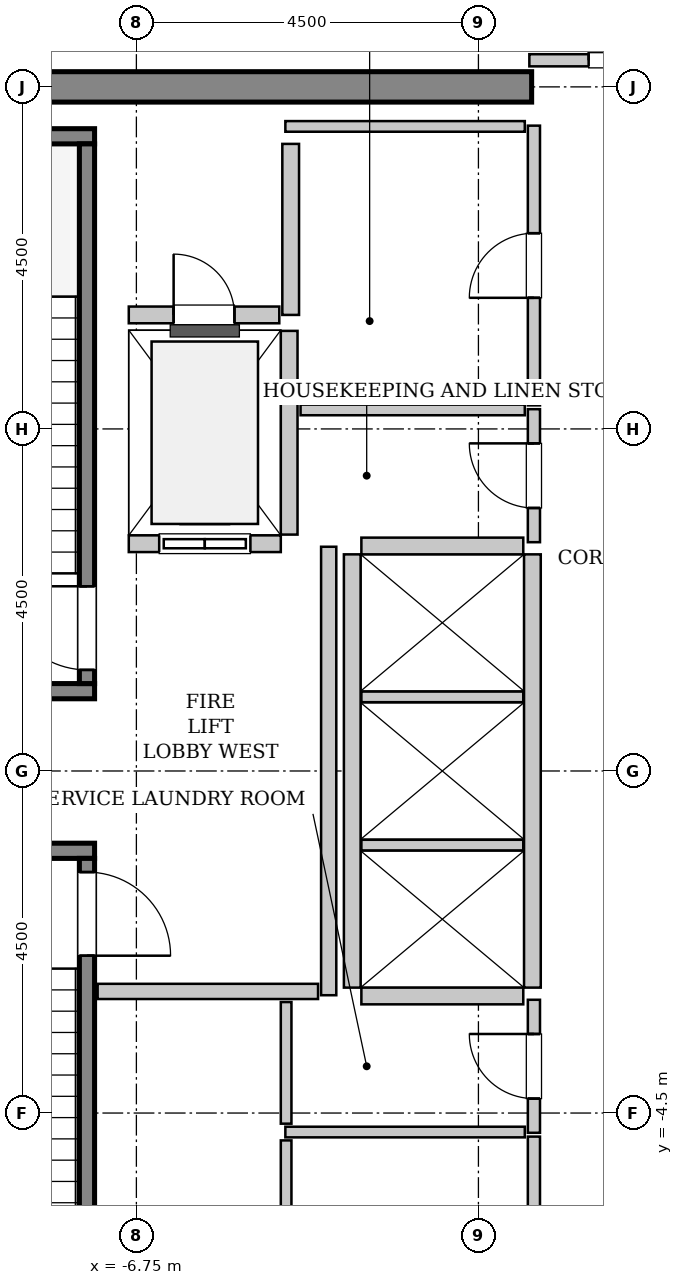
"""IFC4 building model, lengths in metres.
Left out: names, types, materials, properties, quantities, classifications, styles, units other than length and angle.
Written with IfcOpenShell. Run it as: python <this file> out.ifc"""

import sys

from ifc_helpers import new_model, si_unit, direction, frame, frame_2d, origin, place, context, subcontext, project, spatial, rectangle, extrude, source, transform, mapped, element, fill, save


model = new_model("IFC4")
c1 = context("Model", 3, precision=1e-05, world=origin(), true_north=direction((0.0, 1.0)))
c2 = subcontext(c1, "Body", "Model", "MODEL_VIEW")
j1 = project(units=[si_unit("LENGTHUNIT", "METRE"), si_unit("PLANEANGLEUNIT", "RADIAN")], contexts=[c1])
p1 = place(None, origin())
s1 = spatial("IfcSite", under=j1, at=p1, CompositionType="ELEMENT")
p2 = place(p1, origin())
s2 = spatial("IfcBuilding", under=s1, at=p2, CompositionType="ELEMENT")
p3 = place(p2, frame((0.0, 0.0, 349.0)))
s3 = spatial("IfcBuildingStorey", under=s2, at=p3, CompositionType="ELEMENT", Elevation=349.0)
m1 = source(origin(), c2, "Body", "SweptSolid", [
    extrude(rectangle(XDim=9.9, YDim=0.4, at=frame_2d((4.95, 0.0))), origin(), (0.0, 0.0, 1.0), 4.8),
])
p4 = place(p3, frame((-11.45, 9.0, 0.0), z_axis=(0.0, 0.0, 1.0), x_axis=(1.0, 0.0, 0.0)))
e1 = element("IfcWall", 1, at=p4, inside=s3, PredefinedType="SHEAR", context=c2, shape_type="MappedRepresentation", body=[
    mapped(m1, transform((0.0, 0.0, 0.0), x_axis=(1.0, 0.0, 0.0), y_axis=(0.0, 1.0, 0.0), z_axis=(0.0, 0.0, 1.0), scale=1.0)),
])
m2 = source(origin(), c2, "Body", "SweptSolid", [
    extrude(rectangle(XDim=3.4, YDim=0.2, at=frame_2d((1.7, 0.0))), origin(), (0.0, 0.0, 1.0), 4.8),
])
p5 = place(p3, frame((-7.3, 1.05, 0.0), z_axis=(0.0, 0.0, 1.0), x_axis=(-1.0, 0.0, 0.0)))
e2 = element("IfcWall", 2, at=p5, inside=s3, PredefinedType="SOLIDWALL", context=c2, shape_type="MappedRepresentation", body=[
    mapped(m2, transform((0.0, 0.0, 0.0), x_axis=(1.0, 0.0, 0.0), y_axis=(0.0, 1.0, 0.0), z_axis=(0.0, 0.0, 1.0), scale=1.0)),
])
m3 = source(origin(), c2, "Body", "SweptSolid", [
    extrude(rectangle(XDim=3.755, YDim=0.2, at=frame_2d((1.877, 0.0))), origin(), (0.0, 0.0, 1.0), 4.8),
])
p6 = place(p3, frame((-7.3, 8.35, 0.0), z_axis=(0.0, 0.0, 1.0), x_axis=(-1.0, 0.0, 0.0)))
e3 = element("IfcWall", 3, at=p6, inside=s3, PredefinedType="SOLIDWALL", context=c2, shape_type="MappedRepresentation", body=[
    mapped(m3, transform((0.0, 0.0, 0.0), x_axis=(1.0, 0.0, 0.0), y_axis=(0.0, 1.0, 0.0), z_axis=(0.0, 0.0, 1.0), scale=1.0)),
])
m4 = source(origin(), c2, "Body", "SweptSolid", [
    extrude(rectangle(XDim=7.1, YDim=0.2, at=frame_2d((3.55, 0.0))), origin(), (0.0, 0.0, 1.0), 4.8),
])
p7 = place(p3, frame((-7.4, 1.15, 0.0), z_axis=(0.0, 0.0, 1.0), x_axis=(0.0, 1.0, 0.0)))
e4 = element("IfcWall", 4, at=p7, inside=s3, PredefinedType="SOLIDWALL", context=c2, shape_type="MappedRepresentation", body=[
    mapped(m4, transform((0.0, 0.0, 0.0), x_axis=(1.0, 0.0, 0.0), y_axis=(0.0, 1.0, 0.0), z_axis=(0.0, 0.0, 1.0), scale=1.0)),
])
p8 = place(p7, frame((0.18, 0.0, 0.0)))
e5 = element("IfcOpeningElement", 5, at=p8, cuts=e4, PredefinedType="OPENING", context=c2, shape_type="SweptSolid", body=[
    extrude(rectangle(XDim=1.1, YDim=2.15, at=frame_2d((0.55, 1.075))), frame((0.0, 0.11, 0.0), z_axis=(0.0, -1.0, 0.0), x_axis=(1.0, 0.0, 0.0)), (0.0, 0.0, 1.0), 0.22),
])
p9 = place(p3, frame((-10.7, -1.05, 0.0), z_axis=(0.0, 0.0, 1.0), x_axis=(1.0, 0.0, 0.0)))
e6 = element("IfcWall", 6, at=p9, inside=s3, PredefinedType="SOLIDWALL", context=c2, shape_type="MappedRepresentation", body=[
    mapped(m2, transform((0.0, 0.0, 0.0), x_axis=(1.0, 0.0, 0.0), y_axis=(0.0, 1.0, 0.0), z_axis=(0.0, 0.0, 1.0), scale=1.0)),
])
p10 = place(p3, frame((-7.4, -1.15, 0.0), z_axis=(0.0, 0.0, 1.0), x_axis=(0.0, -1.0, 0.0)))
e7 = element("IfcWall", 7, at=p10, inside=s3, PredefinedType="SOLIDWALL", context=c2, shape_type="MappedRepresentation", body=[
    mapped(m4, transform((0.0, 0.0, 0.0), x_axis=(1.0, 0.0, 0.0), y_axis=(0.0, 1.0, 0.0), z_axis=(0.0, 0.0, 1.0), scale=1.0)),
])
p11 = place(p10, frame((0.18, 0.0, 0.0)))
e8 = element("IfcOpeningElement", 8, at=p11, cuts=e7, PredefinedType="OPENING", context=c2, shape_type="SweptSolid", body=[
    extrude(rectangle(XDim=1.1, YDim=2.15, at=frame_2d((0.55, 1.075))), frame((0.0, 0.11, 0.0), z_axis=(0.0, -1.0, 0.0), x_axis=(1.0, 0.0, 0.0)), (0.0, 0.0, 1.0), 0.22),
])
m5 = source(origin(), c2, "Body", "SweptSolid", [
    extrude(rectangle(XDim=2.0, YDim=0.22, at=frame_2d((1.0, 0.0))), origin(), (0.0, 0.0, 1.0), 4.485),
])
p12 = place(p3, frame((-6.85, 2.99, 0.0), z_axis=(0.0, 0.0, 1.0), x_axis=(1.0, 0.0, 0.0)))
e9 = element("IfcWall", 9, at=p12, inside=s3, PredefinedType="SOLIDWALL", context=c2, shape_type="MappedRepresentation", body=[
    mapped(m5, transform((0.0, 0.0, 0.0), x_axis=(1.0, 0.0, 0.0), y_axis=(0.0, 1.0, 0.0), z_axis=(0.0, 0.0, 1.0), scale=1.0)),
])
p13 = place(p12, frame((0.4, 0.0, 0.0)))
e10 = element("IfcOpeningElement", 10, at=p13, cuts=e9, PredefinedType="OPENING", context=c2, shape_type="SweptSolid", body=[
    extrude(rectangle(XDim=1.2, YDim=2.2, at=frame_2d((0.6, 1.1))), frame((0.0, 0.12, 0.0), z_axis=(0.0, -1.0, 0.0), x_axis=(1.0, 0.0, 0.0)), (0.0, 0.0, 1.0), 0.24),
])
m6 = source(origin(), c2, "Body", "SweptSolid", [
    extrude(rectangle(XDim=2.68, YDim=0.22, at=frame_2d((1.34, 0.0))), origin(), (0.0, 0.0, 1.0), 4.485),
])
p14 = place(p3, frame((-4.74, 3.11, 0.0), z_axis=(0.0, 0.0, 1.0), x_axis=(0.0, 1.0, 0.0)))
e11 = element("IfcWall", 11, at=p14, inside=s3, PredefinedType="SOLIDWALL", context=c2, shape_type="MappedRepresentation", body=[
    mapped(m6, transform((0.0, 0.0, 0.0), x_axis=(1.0, 0.0, 0.0), y_axis=(0.0, 1.0, 0.0), z_axis=(0.0, 0.0, 1.0), scale=1.0)),
])
m7 = source(origin(), c2, "Body", "SweptSolid", [
    extrude(rectangle(XDim=5.7, YDim=0.22, at=frame_2d((2.85, 0.0))), origin(), (0.0, 0.0, 1.0), 4.485),
])
for number, where, z_axis, x_axis in (
    (12, (-1.54, -2.85, 0.0), (0.0, 0.0, 1.0), (0.0, 1.0, 0.0)),
    (13, (-3.91, 2.85, 0.0), (0.0, 0.0, 1.0), (0.0, -1.0, 0.0)),
):
    element("IfcWall", number, at=place(p3, frame(where, z_axis=z_axis, x_axis=x_axis)), inside=s3, PredefinedType="SOLIDWALL", context=c2, shape_type="MappedRepresentation", body=[
        mapped(m7, transform((0.0, 0.0, 0.0), x_axis=(1.0, 0.0, 0.0), y_axis=(0.0, 1.0, 0.0), z_axis=(0.0, 0.0, 1.0), scale=1.0)),
    ])
m8 = source(origin(), c2, "Body", "SweptSolid", [
    extrude(rectangle(XDim=2.13, YDim=0.22, at=frame_2d((1.065, 0.0))), origin(), (0.0, 0.0, 1.0), 4.485),
])
p15 = place(p3, frame((-3.79, -2.96, 0.0), z_axis=(0.0, 0.0, 1.0), x_axis=(1.0, 0.0, 0.0)))
e14 = element("IfcWall", 14, at=p15, inside=s3, PredefinedType="SOLIDWALL", context=c2, shape_type="MappedRepresentation", body=[
    mapped(m8, transform((0.0, 0.0, 0.0), x_axis=(1.0, 0.0, 0.0), y_axis=(0.0, 1.0, 0.0), z_axis=(0.0, 0.0, 1.0), scale=1.0)),
])
m9 = source(origin(), c2, "Body", "SweptSolid", [
    extrude(rectangle(XDim=2.13, YDim=0.14, at=frame_2d((1.065, 0.0))), origin(), (0.0, 0.0, 1.0), 4.485),
])
for number, where, z_axis, x_axis in (
    (15, (-3.79, -0.975, 0.0), (0.0, 0.0, 1.0), (1.0, 0.0, 0.0)),
    (16, (-3.79, 0.975, 0.0), (0.0, 0.0, 1.0), (1.0, 0.0, 0.0)),
):
    element("IfcWall", number, at=place(p3, frame(where, z_axis=z_axis, x_axis=x_axis)), inside=s3, PredefinedType="PARTITIONING", context=c2, shape_type="MappedRepresentation", body=[
        mapped(m9, transform((0.0, 0.0, 0.0), x_axis=(1.0, 0.0, 0.0), y_axis=(0.0, 1.0, 0.0), z_axis=(0.0, 0.0, 1.0), scale=1.0)),
    ])
p16 = place(p3, frame((-1.66, 2.96, 0.0), z_axis=(0.0, 0.0, 1.0), x_axis=(-1.0, 0.0, 0.0)))
e17 = element("IfcWall", 17, at=p16, inside=s3, PredefinedType="SOLIDWALL", context=c2, shape_type="MappedRepresentation", body=[
    mapped(m8, transform((0.0, 0.0, 0.0), x_axis=(1.0, 0.0, 0.0), y_axis=(0.0, 1.0, 0.0), z_axis=(0.0, 0.0, 1.0), scale=1.0)),
])
m10 = source(origin(), c2, "Body", "SweptSolid", [
    extrude(rectangle(XDim=2.25, YDim=0.22, at=frame_2d((1.125, 0.0))), origin(), (0.0, 0.0, 1.0), 4.485),
])
p17 = place(p3, frame((-4.72, 6.0, 0.0), z_axis=(0.0, 0.0, 1.0), x_axis=(0.0, 1.0, 0.0)))
e18 = element("IfcWall", 18, at=p17, inside=s3, PredefinedType="SOLIDWALL", context=c2, shape_type="MappedRepresentation", body=[
    mapped(m10, transform((0.0, 0.0, 0.0), x_axis=(1.0, 0.0, 0.0), y_axis=(0.0, 1.0, 0.0), z_axis=(0.0, 0.0, 1.0), scale=1.0)),
])
m11 = source(origin(), c2, "Body", "SweptSolid", [
    extrude(rectangle(XDim=1.98, YDim=0.22, at=frame_2d((0.99, 0.0))), origin(), (0.0, 0.0, 1.0), 4.485),
])
p18 = place(p3, frame((-6.85, 6.0, 0.0), z_axis=(0.0, 0.0, 1.0), x_axis=(1.0, 0.0, 0.0)))
e19 = element("IfcWall", 19, at=p18, inside=s3, PredefinedType="SOLIDWALL", context=c2, shape_type="MappedRepresentation", body=[
    mapped(m11, transform((0.0, 0.0, 0.0), x_axis=(1.0, 0.0, 0.0), y_axis=(0.0, 1.0, 0.0), z_axis=(0.0, 0.0, 1.0), scale=1.0)),
])
p19 = place(p18, frame((0.59, 0.0, 0.0)))
e20 = element("IfcOpeningElement", 20, at=p19, cuts=e19, PredefinedType="OPENING", context=c2, shape_type="SweptSolid", body=[
    extrude(rectangle(XDim=0.8, YDim=2.0, at=frame_2d((0.4, 1.0))), frame((0.0, 0.12, 0.0), z_axis=(0.0, -1.0, 0.0), x_axis=(1.0, 0.0, 0.0)), (0.0, 0.0, 1.0), 0.24),
])
m12 = source(origin(), c2, "Body", "SweptSolid", [
    extrude(rectangle(XDim=5.9, YDim=0.2, at=frame_2d((2.95, 0.0))), origin(), (0.0, 0.0, 1.0), 4.485),
])
p20 = place(p3, frame((-4.22, -2.95, 0.0), z_axis=(0.0, 0.0, 1.0), x_axis=(0.0, 1.0, 0.0)))
e21 = element("IfcWall", 21, at=p20, inside=s3, PredefinedType="PARTITIONING", context=c2, shape_type="MappedRepresentation", body=[
    mapped(m12, transform((0.0, 0.0, 0.0), x_axis=(1.0, 0.0, 0.0), y_axis=(0.0, 1.0, 0.0), z_axis=(0.0, 0.0, 1.0), scale=1.0)),
])
m13 = source(origin(), c2, "Body", "SweptSolid", [
    extrude(rectangle(XDim=2.9, YDim=0.2, at=frame_2d((1.45, 0.0))), origin(), (0.0, 0.0, 1.0), 4.485),
])
p21 = place(p3, frame((-7.26, -2.9, 0.0), z_axis=(0.0, 0.0, 1.0), x_axis=(1.0, 0.0, 0.0)))
e22 = element("IfcWall", 22, at=p21, inside=s3, PredefinedType="PARTITIONING", context=c2, shape_type="MappedRepresentation", body=[
    mapped(m13, transform((0.0, 0.0, 0.0), x_axis=(1.0, 0.0, 0.0), y_axis=(0.0, 1.0, 0.0), z_axis=(0.0, 0.0, 1.0), scale=1.0)),
])
m14 = source(origin(), c2, "Body", "SweptSolid", [
    extrude(rectangle(XDim=3.16, YDim=0.16, at=frame_2d((1.58, 0.0))), origin(), (0.0, 0.0, 1.0), 3.575),
])
p22 = place(p3, frame((-1.58, 9.35, 0.0), z_axis=(0.0, 0.0, 1.0), x_axis=(1.0, 0.0, 0.0)))
e23 = element("IfcWall", 23, at=p22, inside=s3, PredefinedType="PARTITIONING", context=c2, shape_type="MappedRepresentation", body=[
    mapped(m14, transform((0.0, 0.0, 0.0), x_axis=(1.0, 0.0, 0.0), y_axis=(0.0, 1.0, 0.0), z_axis=(0.0, 0.0, 1.0), scale=1.0)),
])
p23 = place(p22, frame((0.78, 0.0, 0.0)))
e24 = element("IfcOpeningElement", 24, at=p23, cuts=e23, PredefinedType="OPENING", context=c2, shape_type="SweptSolid", body=[
    extrude(rectangle(XDim=1.6, YDim=2.3, at=frame_2d((0.8, 1.15))), frame((0.0, 0.09, 0.0), z_axis=(0.0, -1.0, 0.0), x_axis=(1.0, 0.0, 0.0)), (0.0, 0.0, 1.0), 0.18),
])
m15 = source(origin(), c2, "Body", "SweptSolid", [
    extrude(rectangle(XDim=1.75, YDim=0.16, at=frame_2d((0.875, 0.0))), origin(), (0.0, 0.0, 1.0), 4.485),
])
p24 = place(p3, frame((-1.52, 3.01, 0.0), z_axis=(0.0, 0.0, 1.0), x_axis=(0.0, 1.0, 0.0)))
e25 = element("IfcWall", 25, at=p24, inside=s3, PredefinedType="PARTITIONING", context=c2, shape_type="MappedRepresentation", body=[
    mapped(m15, transform((0.0, 0.0, 0.0), x_axis=(1.0, 0.0, 0.0), y_axis=(0.0, 1.0, 0.0), z_axis=(0.0, 0.0, 1.0), scale=1.0)),
])
p25 = place(p24, frame((0.45, 0.0, 0.0)))
e26 = element("IfcOpeningElement", 26, at=p25, cuts=e25, PredefinedType="OPENING", context=c2, shape_type="SweptSolid", body=[
    extrude(rectangle(XDim=0.85, YDim=2.1, at=frame_2d((0.425, 1.05))), frame((0.0, 0.09, 0.0), z_axis=(0.0, -1.0, 0.0), x_axis=(1.0, 0.0, 0.0)), (0.0, 0.0, 1.0), 0.18),
])
m16 = source(origin(), c2, "Body", "SweptSolid", [
    extrude(rectangle(XDim=2.95, YDim=0.14, at=frame_2d((1.475, 0.0))), origin(), (0.0, 0.0, 1.0), 4.485),
])
p26 = place(p3, frame((-4.59, 4.75, 0.0), z_axis=(0.0, 0.0, 1.0), x_axis=(1.0, 0.0, 0.0)))
e27 = element("IfcWall", 27, at=p26, inside=s3, PredefinedType="PARTITIONING", context=c2, shape_type="MappedRepresentation", body=[
    mapped(m16, transform((0.0, 0.0, 0.0), x_axis=(1.0, 0.0, 0.0), y_axis=(0.0, 1.0, 0.0), z_axis=(0.0, 0.0, 1.0), scale=1.0)),
])
m17 = source(origin(), c2, "Body", "SweptSolid", [
    extrude(rectangle(XDim=3.68, YDim=0.16, at=frame_2d((1.84, 0.0))), origin(), (0.0, 0.0, 1.0), 4.485),
])
p27 = place(p3, frame((-1.52, 4.81, 0.0), z_axis=(0.0, 0.0, 1.0), x_axis=(0.0, 1.0, 0.0)))
e28 = element("IfcWall", 28, at=p27, inside=s3, PredefinedType="PARTITIONING", context=c2, shape_type="MappedRepresentation", body=[
    mapped(m17, transform((0.0, 0.0, 0.0), x_axis=(1.0, 0.0, 0.0), y_axis=(0.0, 1.0, 0.0), z_axis=(0.0, 0.0, 1.0), scale=1.0)),
])
p28 = place(p27, frame((1.415, 0.0, 0.0)))
e29 = element("IfcOpeningElement", 29, at=p28, cuts=e28, PredefinedType="OPENING", context=c2, shape_type="SweptSolid", body=[
    extrude(rectangle(XDim=0.85, YDim=2.1, at=frame_2d((0.425, 1.05))), frame((0.0, 0.09, 0.0), z_axis=(0.0, -1.0, 0.0), x_axis=(1.0, 0.0, 0.0)), (0.0, 0.0, 1.0), 0.18),
])
m18 = source(origin(), c2, "Body", "SweptSolid", [
    extrude(rectangle(XDim=3.15, YDim=0.14, at=frame_2d((1.575, 0.0))), origin(), (0.0, 0.0, 1.0), 4.485),
])
p29 = place(p3, frame((-4.79, 8.48, 0.0), z_axis=(0.0, 0.0, 1.0), x_axis=(1.0, 0.0, 0.0)))
e30 = element("IfcWall", 30, at=p29, inside=s3, PredefinedType="PARTITIONING", context=c2, shape_type="MappedRepresentation", body=[
    mapped(m18, transform((0.0, 0.0, 0.0), x_axis=(1.0, 0.0, 0.0), y_axis=(0.0, 1.0, 0.0), z_axis=(0.0, 0.0, 1.0), scale=1.0)),
])
p30 = place(p3, frame((-1.52, -4.76, 0.0), z_axis=(0.0, 0.0, 1.0), x_axis=(0.0, 1.0, 0.0)))
e31 = element("IfcWall", 31, at=p30, inside=s3, PredefinedType="PARTITIONING", context=c2, shape_type="MappedRepresentation", body=[
    mapped(m15, transform((0.0, 0.0, 0.0), x_axis=(1.0, 0.0, 0.0), y_axis=(0.0, 1.0, 0.0), z_axis=(0.0, 0.0, 1.0), scale=1.0)),
])
p31 = place(p30, frame((0.45, 0.0, 0.0)))
e32 = element("IfcOpeningElement", 32, at=p31, cuts=e31, PredefinedType="OPENING", context=c2, shape_type="SweptSolid", body=[
    extrude(rectangle(XDim=0.85, YDim=2.1, at=frame_2d((0.425, 1.05))), frame((0.0, 0.09, 0.0), z_axis=(0.0, -1.0, 0.0), x_axis=(1.0, 0.0, 0.0)), (0.0, 0.0, 1.0), 0.18),
])
p32 = place(p3, frame((-4.79, -4.75, 0.0), z_axis=(0.0, 0.0, 1.0), x_axis=(1.0, 0.0, 0.0)))
e33 = element("IfcWall", 33, at=p32, inside=s3, PredefinedType="PARTITIONING", context=c2, shape_type="MappedRepresentation", body=[
    mapped(m18, transform((0.0, 0.0, 0.0), x_axis=(1.0, 0.0, 0.0), y_axis=(0.0, 1.0, 0.0), z_axis=(0.0, 0.0, 1.0), scale=1.0)),
])
m19 = source(origin(), c2, "Body", "SweptSolid", [
    extrude(rectangle(XDim=1.6, YDim=0.14, at=frame_2d((0.8, 0.0))), origin(), (0.0, 0.0, 1.0), 4.485),
])
p33 = place(p3, frame((-4.78, -4.64, 0.0), z_axis=(0.0, 0.0, 1.0), x_axis=(0.0, 1.0, 0.0)))
e34 = element("IfcWall", 34, at=p33, inside=s3, PredefinedType="PARTITIONING", context=c2, shape_type="MappedRepresentation", body=[
    mapped(m19, transform((0.0, 0.0, 0.0), x_axis=(1.0, 0.0, 0.0), y_axis=(0.0, 1.0, 0.0), z_axis=(0.0, 0.0, 1.0), scale=1.0)),
])
p34 = place(p3, frame((-1.52, -8.49, 0.0), z_axis=(0.0, 0.0, 1.0), x_axis=(0.0, 1.0, 0.0)))
e35 = element("IfcWall", 35, at=p34, inside=s3, PredefinedType="PARTITIONING", context=c2, shape_type="MappedRepresentation", body=[
    mapped(m17, transform((0.0, 0.0, 0.0), x_axis=(1.0, 0.0, 0.0), y_axis=(0.0, 1.0, 0.0), z_axis=(0.0, 0.0, 1.0), scale=1.0)),
])
p35 = place(p34, frame((1.415, 0.0, 0.0)))
e36 = element("IfcOpeningElement", 36, at=p35, cuts=e35, PredefinedType="OPENING", context=c2, shape_type="SweptSolid", body=[
    extrude(rectangle(XDim=0.85, YDim=2.1, at=frame_2d((0.425, 1.05))), frame((0.0, 0.09, 0.0), z_axis=(0.0, -1.0, 0.0), x_axis=(1.0, 0.0, 0.0)), (0.0, 0.0, 1.0), 0.18),
])
m20 = source(origin(), c2, "Body", "SweptSolid", [
    extrude(rectangle(XDim=3.63, YDim=0.14, at=frame_2d((1.815, 0.0))), origin(), (0.0, 0.0, 1.0), 4.485),
])
p36 = place(p3, frame((-4.78, -8.49, 0.0), z_axis=(0.0, 0.0, 1.0), x_axis=(0.0, 1.0, 0.0)))
e37 = element("IfcWall", 37, at=p36, inside=s3, PredefinedType="PARTITIONING", context=c2, shape_type="MappedRepresentation", body=[
    mapped(m20, transform((0.0, 0.0, 0.0), x_axis=(1.0, 0.0, 0.0), y_axis=(0.0, 1.0, 0.0), z_axis=(0.0, 0.0, 1.0), scale=1.0)),
])
m21 = source(origin(), c2, "Body", "SweptSolid", [
    extrude(rectangle(XDim=1.1, YDim=2.15, at=frame_2d((0.55, 1.075))), frame((0.0, 0.025, 0.0), z_axis=(0.0, -1.0, 0.0), x_axis=(1.0, 0.0, 0.0)), (0.0, 0.0, 1.0), 0.05),
])
p37 = place(p8, origin())
e38 = element("IfcDoor", 38, at=p37, inside=s3, OperationType="SINGLE_SWING_RIGHT", PredefinedType="DOOR", context=c2, shape_type="MappedRepresentation", body=[
    mapped(m21, transform((0.0, 0.0, 0.0), x_axis=(1.0, 0.0, 0.0), y_axis=(0.0, 1.0, 0.0), z_axis=(0.0, 0.0, 1.0), scale=1.0)),
])
fill(e5, e38)
p38 = place(p11, origin())
e39 = element("IfcDoor", 39, at=p38, inside=s3, OperationType="SINGLE_SWING_RIGHT", PredefinedType="DOOR", context=c2, shape_type="MappedRepresentation", body=[
    mapped(m21, transform((0.0, 0.0, 0.0), x_axis=(1.0, 0.0, 0.0), y_axis=(0.0, 1.0, 0.0), z_axis=(0.0, 0.0, 1.0), scale=1.0)),
])
fill(e8, e39)
m22 = source(origin(), c2, "Body", "SweptSolid", [
    extrude(rectangle(XDim=1.2, YDim=2.2, at=frame_2d((0.6, 1.1))), frame((0.0, 0.025, 0.0), z_axis=(0.0, -1.0, 0.0), x_axis=(1.0, 0.0, 0.0)), (0.0, 0.0, 1.0), 0.05),
])
p39 = place(p13, origin())
e40 = element("IfcDoor", 40, at=p39, inside=s3, OperationType="SLIDING_TO_LEFT", PredefinedType="DOOR", context=c2, shape_type="MappedRepresentation", body=[
    mapped(m22, transform((0.0, 0.0, 0.0), x_axis=(1.0, 0.0, 0.0), y_axis=(0.0, 1.0, 0.0), z_axis=(0.0, 0.0, 1.0), scale=1.0)),
])
fill(e10, e40)
m23 = source(origin(), c2, "Body", "SweptSolid", [
    extrude(rectangle(XDim=0.8, YDim=2.0, at=frame_2d((0.4, 1.0))), frame((0.0, 0.025, 0.0), z_axis=(0.0, -1.0, 0.0), x_axis=(1.0, 0.0, 0.0)), (0.0, 0.0, 1.0), 0.05),
])
p40 = place(p19, origin())
e41 = element("IfcDoor", 41, at=p40, inside=s3, OperationType="SINGLE_SWING_LEFT", PredefinedType="TRAPDOOR", context=c2, shape_type="MappedRepresentation", body=[
    mapped(m23, transform((0.0, 0.0, 0.0), x_axis=(1.0, 0.0, 0.0), y_axis=(0.0, 1.0, 0.0), z_axis=(0.0, 0.0, 1.0), scale=1.0)),
])
fill(e20, e41)
m24 = source(origin(), c2, "Body", "SweptSolid", [
    extrude(rectangle(XDim=1.6, YDim=2.3, at=frame_2d((0.8, 1.15))), frame((0.0, 0.025, 0.0), z_axis=(0.0, -1.0, 0.0), x_axis=(1.0, 0.0, 0.0)), (0.0, 0.0, 1.0), 0.05),
])
p41 = place(p23, origin())
e42 = element("IfcDoor", 42, at=p41, inside=s3, OperationType="DOUBLE_DOOR_SINGLE_SWING", PredefinedType="DOOR", context=c2, shape_type="MappedRepresentation", body=[
    mapped(m24, transform((0.0, 0.0, 0.0), x_axis=(1.0, 0.0, 0.0), y_axis=(0.0, 1.0, 0.0), z_axis=(0.0, 0.0, 1.0), scale=1.0)),
])
fill(e24, e42)
m25 = source(origin(), c2, "Body", "SweptSolid", [
    extrude(rectangle(XDim=0.85, YDim=2.1, at=frame_2d((0.425, 1.05))), frame((0.0, 0.025, 0.0), z_axis=(0.0, -1.0, 0.0), x_axis=(1.0, 0.0, 0.0)), (0.0, 0.0, 1.0), 0.05),
])
p42 = place(p25, origin())
e43 = element("IfcDoor", 43, at=p42, inside=s3, OperationType="SINGLE_SWING_RIGHT", PredefinedType="DOOR", context=c2, shape_type="MappedRepresentation", body=[
    mapped(m25, transform((0.0, 0.0, 0.0), x_axis=(1.0, 0.0, 0.0), y_axis=(0.0, 1.0, 0.0), z_axis=(0.0, 0.0, 1.0), scale=1.0)),
])
fill(e26, e43)
p43 = place(p28, origin())
e44 = element("IfcDoor", 44, at=p43, inside=s3, OperationType="SINGLE_SWING_LEFT", PredefinedType="DOOR", context=c2, shape_type="MappedRepresentation", body=[
    mapped(m25, transform((0.0, 0.0, 0.0), x_axis=(1.0, 0.0, 0.0), y_axis=(0.0, 1.0, 0.0), z_axis=(0.0, 0.0, 1.0), scale=1.0)),
])
fill(e29, e44)
p44 = place(p31, origin())
e45 = element("IfcDoor", 45, at=p44, inside=s3, OperationType="SINGLE_SWING_RIGHT", PredefinedType="DOOR", context=c2, shape_type="MappedRepresentation", body=[
    mapped(m25, transform((0.0, 0.0, 0.0), x_axis=(1.0, 0.0, 0.0), y_axis=(0.0, 1.0, 0.0), z_axis=(0.0, 0.0, 1.0), scale=1.0)),
])
fill(e32, e45)
save(model, sys.argv[1])
